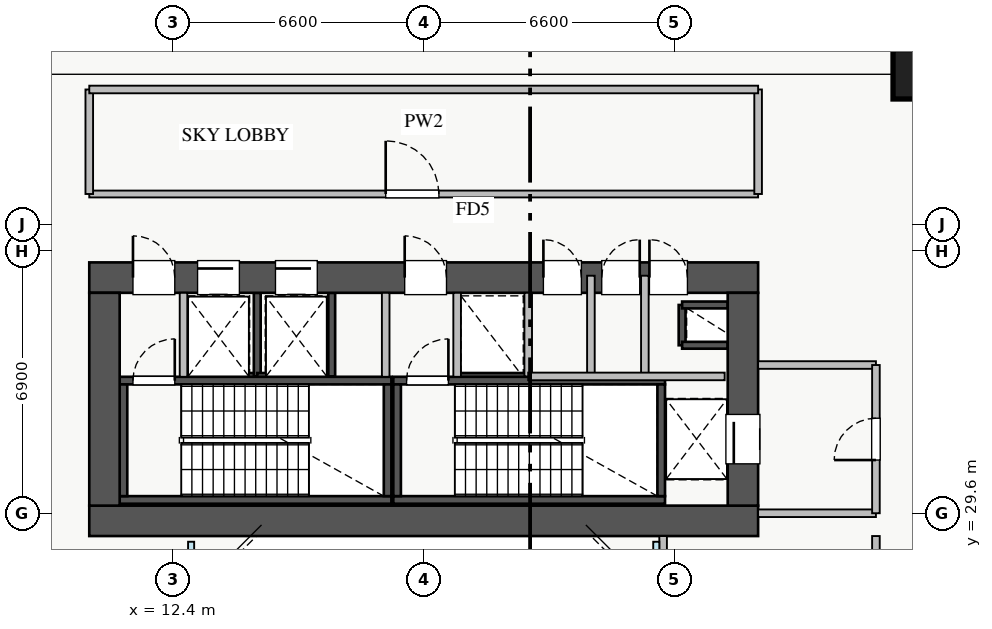
"""IFC4 building model, lengths in metres.
Left out: names, types, materials, properties, quantities, classifications, styles, units other than length and angle.
Written with IfcOpenShell. Run it as: python <this file> out.ifc"""

import sys

from ifc_helpers import new_model, si_unit, direction, frame, frame_2d, origin, origin_2d, place, context, subcontext, project, spatial, rectangle, extrude, source, transform, mapped, element, fill, save


model = new_model("IFC4")
c1 = context("Model", 3, precision=1e-05, world=origin(), true_north=direction((0.0, 1.0)))
c2 = subcontext(c1, "Body", "Model", "MODEL_VIEW")
j1 = project(units=[si_unit("LENGTHUNIT", "METRE"), si_unit("PLANEANGLEUNIT", "RADIAN")], contexts=[c1])
p1 = place(None, origin())
s1 = spatial("IfcSite", under=j1, at=p1, CompositionType="ELEMENT")
p2 = place(p1, origin())
s2 = spatial("IfcBuilding", under=s1, at=p2, CompositionType="ELEMENT")
p3 = place(p2, frame((0.0, 0.0, 92.5)))
s3 = spatial("IfcBuildingStorey", under=s2, at=p3, CompositionType="ELEMENT", Elevation=92.5)
p4 = place(p3, frame((12.68, 33.2, 0.0), z_axis=(0.0, 0.0, 1.0), x_axis=(1.0, 0.0, 0.0)))
e1 = element("IfcWall", 1, at=p4, inside=s3, PredefinedType="SHEAR", context=c2, shape_type="SweptSolid", body=[
    extrude(rectangle(XDim=1.94, YDim=0.18, at=frame_2d((0.97, 0.0))), origin(), (0.0, 0.0, 1.0), 4.32),
])
p5 = place(p3, frame((14.62, 33.2, 0.0), z_axis=(0.0, 0.0, 1.0), x_axis=(0.0, 1.0, 0.0)))
e2 = element("IfcWall", 2, at=p5, inside=s3, PredefinedType="SHEAR", context=c2, shape_type="SweptSolid", body=[
    extrude(rectangle(XDim=2.2, YDim=0.18, at=frame_2d((1.1, 0.0))), origin(), (0.0, 0.0, 1.0), 4.32),
])
p6 = place(p3, frame((25.8, 34.02, 0.0), z_axis=(0.0, 0.0, 1.0), x_axis=(0.0, 1.0, 0.0)))
e3 = element("IfcWall", 3, at=p6, inside=s3, PredefinedType="SHEAR", context=c2, shape_type="SweptSolid", body=[
    extrude(rectangle(XDim=1.06, YDim=0.18, at=frame_2d((0.53, 0.0))), origin(), (0.0, 0.0, 1.0), 4.32),
])
for number, where, z_axis, x_axis in (
    (4, (25.8, 35.08, 0.0), (0.0, 0.0, 1.0), (1.0, 0.0, 0.0)),
    (5, (25.8, 34.02, 0.0), (0.0, 0.0, 1.0), (1.0, 0.0, 0.0)),
):
    element("IfcWall", number, at=place(p3, frame(where, z_axis=z_axis, x_axis=x_axis)), inside=s3, PredefinedType="SHEAR", context=c2, shape_type="SweptSolid", body=[
        extrude(rectangle(XDim=1.2, YDim=0.18, at=frame_2d((0.6, 0.0))), origin(), (0.0, 0.0, 1.0), 4.32),
    ])
p7 = place(p3, frame((14.62, 33.2, 0.0), z_axis=(0.0, 0.0, 1.0), x_axis=(1.0, 0.0, 0.0)))
e6 = element("IfcWall", 6, at=p7, inside=s3, PredefinedType="SHEAR", context=c2, shape_type="SweptSolid", body=[
    extrude(rectangle(XDim=1.96, YDim=0.18, at=frame_2d((0.98, 0.0))), origin(), (0.0, 0.0, 1.0), 4.32),
])
p8 = place(p3, frame((16.58, 33.2, 0.0), z_axis=(0.0, 0.0, 1.0), x_axis=(0.0, 1.0, 0.0)))
e7 = element("IfcWall", 7, at=p8, inside=s3, PredefinedType="SHEAR", context=c2, shape_type="SweptSolid", body=[
    extrude(rectangle(XDim=2.2, YDim=0.18, at=frame_2d((1.1, 0.0))), origin(), (0.0, 0.0, 1.0), 4.32),
])
p9 = place(p3, frame((19.88, 33.2, 0.0), z_axis=(0.0, 0.0, 1.0), x_axis=(1.0, 0.0, 0.0)))
e8 = element("IfcWall", 8, at=p9, inside=s3, PredefinedType="SHEAR", context=c2, shape_type="SweptSolid", body=[
    extrude(rectangle(XDim=1.87, YDim=0.18, at=frame_2d((0.935, 0.0))), origin(), (0.0, 0.0, 1.0), 4.32),
])
p10 = place(p3, frame((11.0, 29.95, 0.0), z_axis=(0.0, 0.0, 1.0), x_axis=(1.0, 0.0, 0.0)))
e9 = element("IfcWall", 9, at=p10, inside=s3, PredefinedType="SHEAR", context=c2, shape_type="SweptSolid", body=[
    extrude(rectangle(XDim=7.15, YDim=0.2, at=frame_2d((3.575, 0.0))), origin(), (0.0, 0.0, 1.0), 4.5),
])
p11 = place(p3, frame((11.0, 33.09, 0.0), z_axis=(0.0, 0.0, 1.0), x_axis=(1.0, 0.0, 0.0)))
e10 = element("IfcWall", 10, at=p11, inside=s3, PredefinedType="SHEAR", context=c2, shape_type="SweptSolid", body=[
    extrude(rectangle(XDim=7.15, YDim=0.2, at=frame_2d((3.575, 0.0))), origin(), (0.0, 0.0, 1.0), 4.5),
])
p12 = place(p11, frame((0.35, 0.0, 0.0)))
e11 = element("IfcOpeningElement", 11, at=p12, cuts=e10, PredefinedType="OPENING", context=c2, shape_type="SweptSolid", body=[
    extrude(rectangle(XDim=1.1, YDim=2.05, at=frame_2d((0.55, 1.025))), frame((0.0, 0.11, 0.0), z_axis=(0.0, -1.0, 0.0), x_axis=(1.0, 0.0, 0.0)), (0.0, 0.0, 1.0), 0.22),
])
for number, where, z_axis, x_axis in (
    (12, (11.1, 30.05, 0.0), (0.0, 0.0, 1.0), (0.0, 1.0, 0.0)),
    (13, (18.05, 30.05, 0.0), (0.0, 0.0, 1.0), (0.0, 1.0, 0.0)),
):
    element("IfcWall", number, at=place(p3, frame(where, z_axis=z_axis, x_axis=x_axis)), inside=s3, PredefinedType="SHEAR", context=c2, shape_type="SweptSolid", body=[
        extrude(rectangle(XDim=2.94, YDim=0.2, at=frame_2d((1.47, 0.0))), origin(), (0.0, 0.0, 1.0), 4.5),
    ])
p13 = place(p3, frame((18.2, 29.95, 0.0), z_axis=(0.0, 0.0, 1.0), x_axis=(1.0, 0.0, 0.0)))
e14 = element("IfcWall", 14, at=p13, inside=s3, PredefinedType="SHEAR", context=c2, shape_type="SweptSolid", body=[
    extrude(rectangle(XDim=7.15, YDim=0.2, at=frame_2d((3.575, 0.0))), origin(), (0.0, 0.0, 1.0), 4.5),
])
p14 = place(p3, frame((18.2, 33.09, 0.0), z_axis=(0.0, 0.0, 1.0), x_axis=(1.0, 0.0, 0.0)))
e15 = element("IfcWall", 15, at=p14, inside=s3, PredefinedType="SHEAR", context=c2, shape_type="SweptSolid", body=[
    extrude(rectangle(XDim=7.15, YDim=0.2, at=frame_2d((3.575, 0.0))), origin(), (0.0, 0.0, 1.0), 4.5),
])
p15 = place(p14, frame((0.35, 0.0, 0.0)))
e16 = element("IfcOpeningElement", 16, at=p15, cuts=e15, PredefinedType="OPENING", context=c2, shape_type="SweptSolid", body=[
    extrude(rectangle(XDim=1.1, YDim=2.05, at=frame_2d((0.55, 1.025))), frame((0.0, 0.11, 0.0), z_axis=(0.0, -1.0, 0.0), x_axis=(1.0, 0.0, 0.0)), (0.0, 0.0, 1.0), 0.22),
])
for number, where, z_axis, x_axis in (
    (17, (18.3, 30.05, 0.0), (0.0, 0.0, 1.0), (0.0, 1.0, 0.0)),
    (18, (25.25, 30.05, 0.0), (0.0, 0.0, 1.0), (0.0, 1.0, 0.0)),
):
    element("IfcWall", number, at=place(p3, frame(where, z_axis=z_axis, x_axis=x_axis)), inside=s3, PredefinedType="SHEAR", context=c2, shape_type="SweptSolid", body=[
        extrude(rectangle(XDim=2.94, YDim=0.2, at=frame_2d((1.47, 0.0))), origin(), (0.0, 0.0, 1.0), 4.5),
    ])
p16 = place(p3, frame((10.2, 29.4, 0.0), z_axis=(0.0, 0.0, 1.0), x_axis=(1.0, 0.0, 0.0)))
e19 = element("IfcWall", 19, at=p16, inside=s3, PredefinedType="SHEAR", context=c2, shape_type="SweptSolid", body=[
    extrude(rectangle(XDim=17.6, YDim=0.8, at=frame_2d((8.8, 0.0))), origin(), (0.0, 0.0, 1.0), 4.5),
])
p17 = place(p3, frame((10.2, 35.8, 0.0), z_axis=(0.0, 0.0, 1.0), x_axis=(1.0, 0.0, 0.0)))
e20 = element("IfcWall", 20, at=p17, inside=s3, PredefinedType="SHEAR", context=c2, shape_type="SweptSolid", body=[
    extrude(rectangle(XDim=17.6, YDim=0.8, at=frame_2d((8.8, 0.0))), origin(), (0.0, 0.0, 1.0), 4.5),
])
p18 = place(p17, frame((1.15, 0.0, 0.0)))
e21 = element("IfcOpeningElement", 21, at=p18, cuts=e20, PredefinedType="OPENING", context=c2, shape_type="SweptSolid", body=[
    extrude(rectangle(XDim=1.1, YDim=2.05, at=frame_2d((0.55, 1.025))), frame((0.0, 0.41, 0.0), z_axis=(0.0, -1.0, 0.0), x_axis=(1.0, 0.0, 0.0)), (0.0, 0.0, 1.0), 0.82),
])
p19 = place(p17, frame((8.3, 0.0, 0.0)))
e22 = element("IfcOpeningElement", 22, at=p19, cuts=e20, PredefinedType="OPENING", context=c2, shape_type="SweptSolid", body=[
    extrude(rectangle(XDim=1.1, YDim=2.05, at=frame_2d((0.55, 1.025))), frame((0.0, 0.41, 0.0), z_axis=(0.0, -1.0, 0.0), x_axis=(1.0, 0.0, 0.0)), (0.0, 0.0, 1.0), 0.82),
])
p20 = place(p17, frame((4.9, 0.0, 0.0)))
e23 = element("IfcOpeningElement", 23, at=p20, cuts=e20, PredefinedType="OPENING", context=c2, shape_type="SweptSolid", body=[
    extrude(rectangle(XDim=1.1, YDim=2.05, at=frame_2d((0.55, 1.025))), frame((0.0, 0.41, 0.0), z_axis=(0.0, -1.0, 0.0), x_axis=(1.0, 0.0, 0.0)), (0.0, 0.0, 1.0), 0.82),
])
p21 = place(p17, frame((2.85, 0.0, 0.0)))
e24 = element("IfcOpeningElement", 24, at=p21, cuts=e20, PredefinedType="OPENING", context=c2, shape_type="SweptSolid", body=[
    extrude(rectangle(XDim=1.1, YDim=2.05, at=frame_2d((0.55, 1.025))), frame((0.0, 0.41, 0.0), z_axis=(0.0, -1.0, 0.0), x_axis=(1.0, 0.0, 0.0)), (0.0, 0.0, 1.0), 0.82),
])
p22 = place(p17, frame((14.74, 0.0, 0.0)))
e25 = element("IfcOpeningElement", 25, at=p22, cuts=e20, PredefinedType="OPENING", context=c2, shape_type="SweptSolid", body=[
    extrude(rectangle(XDim=1.0, YDim=2.05, at=frame_2d((0.5, 1.025))), frame((0.0, 0.41, 0.0), z_axis=(0.0, -1.0, 0.0), x_axis=(1.0, 0.0, 0.0)), (0.0, 0.0, 1.0), 0.82),
])
p23 = place(p17, frame((11.95, 0.0, 0.0)))
e26 = element("IfcOpeningElement", 26, at=p23, cuts=e20, PredefinedType="OPENING", context=c2, shape_type="SweptSolid", body=[
    extrude(rectangle(XDim=1.0, YDim=2.05, at=frame_2d((0.5, 1.025))), frame((0.0, 0.41, 0.0), z_axis=(0.0, -1.0, 0.0), x_axis=(1.0, 0.0, 0.0)), (0.0, 0.0, 1.0), 0.82),
])
p24 = place(p17, frame((13.485, 0.0, 0.0)))
e27 = element("IfcOpeningElement", 27, at=p24, cuts=e20, PredefinedType="OPENING", context=c2, shape_type="SweptSolid", body=[
    extrude(rectangle(XDim=1.0, YDim=2.05, at=frame_2d((0.5, 1.025))), frame((0.0, 0.41, 0.0), z_axis=(0.0, -1.0, 0.0), x_axis=(1.0, 0.0, 0.0)), (0.0, 0.0, 1.0), 0.82),
])
p25 = place(p3, frame((10.6, 29.8, 0.0), z_axis=(0.0, 0.0, 1.0), x_axis=(0.0, 1.0, 0.0)))
e28 = element("IfcWall", 28, at=p25, inside=s3, PredefinedType="SHEAR", context=c2, shape_type="SweptSolid", body=[
    extrude(rectangle(XDim=5.6, YDim=0.8, at=frame_2d((2.8, 0.0))), origin(), (0.0, 0.0, 1.0), 4.5),
])
p26 = place(p3, frame((27.4, 29.8, 0.0), z_axis=(0.0, 0.0, 1.0), x_axis=(0.0, 1.0, 0.0)))
e29 = element("IfcWall", 29, at=p26, inside=s3, PredefinedType="SHEAR", context=c2, shape_type="SweptSolid", body=[
    extrude(rectangle(XDim=5.6, YDim=0.8, at=frame_2d((2.8, 0.0))), origin(), (0.0, 0.0, 1.0), 4.5),
])
p27 = place(p26, frame((1.1, 0.0, 0.0)))
e30 = element("IfcOpeningElement", 30, at=p27, cuts=e29, PredefinedType="OPENING", context=c2, shape_type="SweptSolid", body=[
    extrude(rectangle(XDim=1.3, YDim=2.05, at=frame_2d((0.65, 1.025))), frame((0.0, 0.41, 0.0), z_axis=(0.0, -1.0, 0.0), x_axis=(1.0, 0.0, 0.0)), (0.0, 0.0, 1.0), 0.82),
])
m1 = source(origin(), c2, "Body", "SweptSolid", [
    extrude(rectangle(XDim=1.3, YDim=1.3, at=origin_2d()), origin(), (0.0, 0.0, 1.0), 4.5),
])
p28 = place(p3, frame((32.0, 41.15, 0.0), z_axis=(0.0, 0.0, 1.0), x_axis=(1.0, 0.0, 0.0)))
e31 = element("IfcColumn", 31, at=p28, inside=s3, PredefinedType="COLUMN", context=c2, shape_type="MappedRepresentation", body=[
    mapped(m1, transform((0.0, 0.0, 0.0), x_axis=(1.0, 0.0, 0.0), y_axis=(0.0, 1.0, 0.0), z_axis=(0.0, 0.0, 1.0), scale=1.0)),
])
p29 = place(p3, frame((27.8, 29.6, 0.0), z_axis=(0.0, 0.0, 1.0), x_axis=(1.0, 0.0, 0.0)))
e32 = element("IfcWall", 32, at=p29, inside=s3, PredefinedType="PARTITIONING", context=c2, shape_type="SweptSolid", body=[
    extrude(rectangle(XDim=3.1, YDim=0.2, at=frame_2d((1.55, 0.0))), origin(), (0.0, 0.0, 1.0), 4.32),
])
p30 = place(p3, frame((27.8, 33.5, 0.0), z_axis=(0.0, 0.0, 1.0), x_axis=(1.0, 0.0, 0.0)))
e33 = element("IfcWall", 33, at=p30, inside=s3, PredefinedType="PARTITIONING", context=c2, shape_type="SweptSolid", body=[
    extrude(rectangle(XDim=3.1, YDim=0.2, at=frame_2d((1.55, 0.0))), origin(), (0.0, 0.0, 1.0), 3.315),
])
p31 = place(p3, frame((30.9, 29.6, 0.0), z_axis=(0.0, 0.0, 1.0), x_axis=(0.0, 1.0, 0.0)))
e34 = element("IfcWall", 34, at=p31, inside=s3, PredefinedType="PARTITIONING", context=c2, shape_type="SweptSolid", body=[
    extrude(rectangle(XDim=3.9, YDim=0.2, at=frame_2d((1.95, 0.0))), origin(), (0.0, 0.0, 1.0), 4.32),
])
p32 = place(p31, frame((1.4, 0.0, 0.0)))
e35 = element("IfcOpeningElement", 35, at=p32, cuts=e34, PredefinedType="OPENING", context=c2, shape_type="SweptSolid", body=[
    extrude(rectangle(XDim=1.1, YDim=2.05, at=frame_2d((0.55, 1.025))), frame((0.0, 0.11, 0.0), z_axis=(0.0, -1.0, 0.0), x_axis=(1.0, 0.0, 0.0)), (0.0, 0.0, 1.0), 0.22),
])
for number, where, z_axis, x_axis in (
    (36, (12.68, 33.19, 0.0), (0.0, 0.0, 1.0), (0.0, 1.0, 0.0)),
    (37, (18.0, 33.19, 0.0), (0.0, 0.0, 1.0), (0.0, 1.0, 0.0)),
    (38, (19.88, 33.19, 0.0), (0.0, 0.0, 1.0), (0.0, 1.0, 0.0)),
):
    element("IfcWall", number, at=place(p3, frame(where, z_axis=z_axis, x_axis=x_axis)), inside=s3, PredefinedType="PARTITIONING", context=c2, shape_type="SweptSolid", body=[
        extrude(rectangle(XDim=2.21, YDim=0.2, at=frame_2d((1.105, 0.0))), origin(), (0.0, 0.0, 1.0), 4.32),
    ])
p33 = place(p3, frame((24.82, 33.2, 0.0), z_axis=(0.0, 0.0, 1.0), x_axis=(0.0, 1.0, 0.0)))
e39 = element("IfcWall", 39, at=p33, inside=s3, PredefinedType="PARTITIONING", context=c2, shape_type="SweptSolid", body=[
    extrude(rectangle(XDim=2.65, YDim=0.2, at=frame_2d((1.325, 0.0))), origin(), (0.0, 0.0, 1.0), 4.32),
])
p34 = place(p3, frame((21.75, 33.2, 0.0), z_axis=(0.0, 0.0, 1.0), x_axis=(0.0, 1.0, 0.0)))
e40 = element("IfcWall", 40, at=p34, inside=s3, PredefinedType="PARTITIONING", context=c2, shape_type="SweptSolid", body=[
    extrude(rectangle(XDim=2.2, YDim=0.2, at=frame_2d((1.1, 0.0))), origin(), (0.0, 0.0, 1.0), 4.32),
])
p35 = place(p3, frame((23.4, 33.2, 0.0), z_axis=(0.0, 0.0, 1.0), x_axis=(0.0, 1.0, 0.0)))
e41 = element("IfcWall", 41, at=p35, inside=s3, PredefinedType="PARTITIONING", context=c2, shape_type="SweptSolid", body=[
    extrude(rectangle(XDim=2.65, YDim=0.2, at=frame_2d((1.325, 0.0))), origin(), (0.0, 0.0, 1.0), 4.32),
])
p36 = place(p3, frame((21.75, 33.2, 0.0), z_axis=(0.0, 0.0, 1.0), x_axis=(1.0, 0.0, 0.0)))
e42 = element("IfcWall", 42, at=p36, inside=s3, PredefinedType="PARTITIONING", context=c2, shape_type="SweptSolid", body=[
    extrude(rectangle(XDim=5.17, YDim=0.2, at=frame_2d((2.585, 0.0))), origin(), (0.0, 0.0, 1.0), 4.32),
])
p37 = place(p3, frame((10.2, 38.0, 0.0), z_axis=(0.0, 0.0, 1.0), x_axis=(1.0, 0.0, 0.0)))
e43 = element("IfcWall", 43, at=p37, inside=s3, PredefinedType="PARTITIONING", context=c2, shape_type="SweptSolid", body=[
    extrude(rectangle(XDim=17.6, YDim=0.18, at=frame_2d((8.8, 0.0))), origin(), (0.0, 0.0, 1.0), 4.32),
])
p38 = place(p37, frame((7.8, 0.0, 0.0)))
e44 = element("IfcOpeningElement", 44, at=p38, cuts=e43, PredefinedType="OPENING", context=c2, shape_type="SweptSolid", body=[
    extrude(rectangle(XDim=1.4, YDim=2.05, at=frame_2d((0.7, 1.025))), frame((0.0, 0.1, 0.0), z_axis=(0.0, -1.0, 0.0), x_axis=(1.0, 0.0, 0.0)), (0.0, 0.0, 1.0), 0.2),
])
for number, where, z_axis, x_axis in (
    (45, (10.2, 38.0, 0.0), (0.0, 0.0, 1.0), (0.0, 1.0, 0.0)),
    (46, (27.8, 38.0, 0.0), (0.0, 0.0, 1.0), (0.0, 1.0, 0.0)),
):
    element("IfcWall", number, at=place(p3, frame(where, z_axis=z_axis, x_axis=x_axis)), inside=s3, PredefinedType="PARTITIONING", context=c2, shape_type="SweptSolid", body=[
        extrude(rectangle(XDim=2.75, YDim=0.2, at=frame_2d((1.375, 0.0))), origin(), (0.0, 0.0, 1.0), 4.32),
    ])
p39 = place(p3, frame((10.2, 40.75, 0.0), z_axis=(0.0, 0.0, 1.0), x_axis=(1.0, 0.0, 0.0)))
e47 = element("IfcWall", 47, at=p39, inside=s3, PredefinedType="PARTITIONING", context=c2, shape_type="SweptSolid", body=[
    extrude(rectangle(XDim=17.6, YDim=0.2, at=frame_2d((8.8, 0.0))), origin(), (0.0, 0.0, 1.0), 1.915),
])
p40 = place(p3, frame((25.3, 17.0, 0.0), z_axis=(0.0, 0.0, 1.0), x_axis=(0.0, 1.0, 0.0)))
e48 = element("IfcWall", 48, at=p40, inside=s3, PredefinedType="PARTITIONING", context=c2, shape_type="SweptSolid", body=[
    extrude(rectangle(XDim=12.0, YDim=0.2, at=frame_2d((6.0, 0.0))), origin(), (0.0, 0.0, 1.0), 2.515),
])
p41 = place(p3, frame((30.9, 17.0, 0.0), z_axis=(0.0, 0.0, 1.0), x_axis=(0.0, 1.0, 0.0)))
e49 = element("IfcWall", 49, at=p41, inside=s3, PredefinedType="PARTITIONING", context=c2, shape_type="SweptSolid", body=[
    extrude(rectangle(XDim=12.0, YDim=0.2, at=frame_2d((6.0, 0.0))), origin(), (0.0, 0.0, 1.0), 4.32),
])
p42 = place(p41, frame((1.25, 0.0, 0.0)))
e50 = element("IfcOpeningElement", 50, at=p42, cuts=e49, PredefinedType="OPENING", context=c2, shape_type="SweptSolid", body=[
    extrude(rectangle(XDim=1.0, YDim=2.05, at=frame_2d((0.5, 1.025))), frame((0.0, 0.11, 0.0), z_axis=(0.0, -1.0, 0.0), x_axis=(1.0, 0.0, 0.0)), (0.0, 0.0, 1.0), 0.22),
])
p43 = place(p41, frame((7.25, 0.0, 0.0)))
e51 = element("IfcOpeningElement", 51, at=p43, cuts=e49, PredefinedType="OPENING", context=c2, shape_type="SweptSolid", body=[
    extrude(rectangle(XDim=1.0, YDim=2.05, at=frame_2d((0.5, 1.025))), frame((0.0, 0.11, 0.0), z_axis=(0.0, -1.0, 0.0), x_axis=(1.0, 0.0, 0.0)), (0.0, 0.0, 1.0), 0.22),
])
m2 = source(origin(), c2, "Body", "SweptSolid", [
    extrude(rectangle(XDim=1.3, YDim=2.05, at=frame_2d((0.65, 1.025))), frame((0.0, 0.025, 0.0), z_axis=(0.0, -1.0, 0.0), x_axis=(1.0, 0.0, 0.0)), (0.0, 0.0, 1.0), 0.05),
])
p44 = place(p27, origin())
e52 = element("IfcDoor", 52, at=p44, inside=s3, OperationType="SLIDING_TO_LEFT", PredefinedType="DOOR", context=c2, shape_type="MappedRepresentation", body=[
    mapped(m2, transform((0.0, 0.0, 0.0), x_axis=(1.0, 0.0, 0.0), y_axis=(0.0, 1.0, 0.0), z_axis=(0.0, 0.0, 1.0), scale=1.0)),
])
fill(e30, e52)
m3 = source(origin(), c2, "Body", "SweptSolid", [
    extrude(rectangle(XDim=1.1, YDim=2.05, at=frame_2d((0.55, 1.025))), frame((0.0, 0.025, 0.0), z_axis=(0.0, -1.0, 0.0), x_axis=(1.0, 0.0, 0.0)), (0.0, 0.0, 1.0), 0.05),
])
p45 = place(p18, origin())
e53 = element("IfcDoor", 53, at=p45, inside=s3, OperationType="SINGLE_SWING_LEFT", PredefinedType="DOOR", context=c2, shape_type="MappedRepresentation", body=[
    mapped(m3, transform((0.0, 0.0, 0.0), x_axis=(1.0, 0.0, 0.0), y_axis=(0.0, 1.0, 0.0), z_axis=(0.0, 0.0, 1.0), scale=1.0)),
])
fill(e21, e53)
p46 = place(p12, origin())
e54 = element("IfcDoor", 54, at=p46, inside=s3, OperationType="SINGLE_SWING_RIGHT", PredefinedType="DOOR", context=c2, shape_type="MappedRepresentation", body=[
    mapped(m3, transform((0.0, 0.0, 0.0), x_axis=(1.0, 0.0, 0.0), y_axis=(0.0, 1.0, 0.0), z_axis=(0.0, 0.0, 1.0), scale=1.0)),
])
fill(e11, e54)
p47 = place(p19, origin())
e55 = element("IfcDoor", 55, at=p47, inside=s3, OperationType="SINGLE_SWING_LEFT", PredefinedType="DOOR", context=c2, shape_type="MappedRepresentation", body=[
    mapped(m3, transform((0.0, 0.0, 0.0), x_axis=(1.0, 0.0, 0.0), y_axis=(0.0, 1.0, 0.0), z_axis=(0.0, 0.0, 1.0), scale=1.0)),
])
fill(e22, e55)
p48 = place(p15, origin())
e56 = element("IfcDoor", 56, at=p48, inside=s3, OperationType="SINGLE_SWING_RIGHT", PredefinedType="DOOR", context=c2, shape_type="MappedRepresentation", body=[
    mapped(m3, transform((0.0, 0.0, 0.0), x_axis=(1.0, 0.0, 0.0), y_axis=(0.0, 1.0, 0.0), z_axis=(0.0, 0.0, 1.0), scale=1.0)),
])
fill(e16, e56)
p49 = place(p20, origin())
e57 = element("IfcDoor", 57, at=p49, inside=s3, OperationType="SLIDING_TO_LEFT", PredefinedType="DOOR", context=c2, shape_type="MappedRepresentation", body=[
    mapped(m3, transform((0.0, 0.0, 0.0), x_axis=(1.0, 0.0, 0.0), y_axis=(0.0, 1.0, 0.0), z_axis=(0.0, 0.0, 1.0), scale=1.0)),
])
fill(e23, e57)
p50 = place(p21, origin())
e58 = element("IfcDoor", 58, at=p50, inside=s3, OperationType="SLIDING_TO_LEFT", PredefinedType="DOOR", context=c2, shape_type="MappedRepresentation", body=[
    mapped(m3, transform((0.0, 0.0, 0.0), x_axis=(1.0, 0.0, 0.0), y_axis=(0.0, 1.0, 0.0), z_axis=(0.0, 0.0, 1.0), scale=1.0)),
])
fill(e24, e58)
m4 = source(origin(), c2, "Body", "SweptSolid", [
    extrude(rectangle(XDim=1.0, YDim=2.05, at=frame_2d((0.5, 1.025))), frame((0.0, 0.025, 0.0), z_axis=(0.0, -1.0, 0.0), x_axis=(1.0, 0.0, 0.0)), (0.0, 0.0, 1.0), 0.05),
])
p51 = place(p22, origin())
e59 = element("IfcDoor", 59, at=p51, inside=s3, OperationType="SINGLE_SWING_LEFT", PredefinedType="DOOR", context=c2, shape_type="MappedRepresentation", body=[
    mapped(m4, transform((0.0, 0.0, 0.0), x_axis=(1.0, 0.0, 0.0), y_axis=(0.0, 1.0, 0.0), z_axis=(0.0, 0.0, 1.0), scale=1.0)),
])
fill(e25, e59)
p52 = place(p23, origin())
e60 = element("IfcDoor", 60, at=p52, inside=s3, OperationType="SINGLE_SWING_LEFT", PredefinedType="DOOR", context=c2, shape_type="MappedRepresentation", body=[
    mapped(m4, transform((0.0, 0.0, 0.0), x_axis=(1.0, 0.0, 0.0), y_axis=(0.0, 1.0, 0.0), z_axis=(0.0, 0.0, 1.0), scale=1.0)),
])
fill(e26, e60)
p53 = place(p24, origin())
e61 = element("IfcDoor", 61, at=p53, inside=s3, OperationType="SINGLE_SWING_RIGHT", PredefinedType="DOOR", context=c2, shape_type="MappedRepresentation", body=[
    mapped(m4, transform((0.0, 0.0, 0.0), x_axis=(1.0, 0.0, 0.0), y_axis=(0.0, 1.0, 0.0), z_axis=(0.0, 0.0, 1.0), scale=1.0)),
])
fill(e27, e61)
p54 = place(p32, origin())
e62 = element("IfcDoor", 62, at=p54, inside=s3, OperationType="SINGLE_SWING_LEFT", PredefinedType="DOOR", context=c2, shape_type="MappedRepresentation", body=[
    mapped(m3, transform((0.0, 0.0, 0.0), x_axis=(1.0, 0.0, 0.0), y_axis=(0.0, 1.0, 0.0), z_axis=(0.0, 0.0, 1.0), scale=1.0)),
])
fill(e35, e62)
m5 = source(origin(), c2, "Body", "SweptSolid", [
    extrude(rectangle(XDim=1.4, YDim=2.05, at=frame_2d((0.7, 1.025))), frame((0.0, 0.025, 0.0), z_axis=(0.0, -1.0, 0.0), x_axis=(1.0, 0.0, 0.0)), (0.0, 0.0, 1.0), 0.05),
])
p55 = place(p38, origin())
e63 = element("IfcDoor", 63, at=p55, inside=s3, OperationType="SINGLE_SWING_LEFT", PredefinedType="DOOR", context=c2, shape_type="MappedRepresentation", body=[
    mapped(m5, transform((0.0, 0.0, 0.0), x_axis=(1.0, 0.0, 0.0), y_axis=(0.0, 1.0, 0.0), z_axis=(0.0, 0.0, 1.0), scale=1.0)),
])
fill(e44, e63)
save(model, sys.argv[1])
